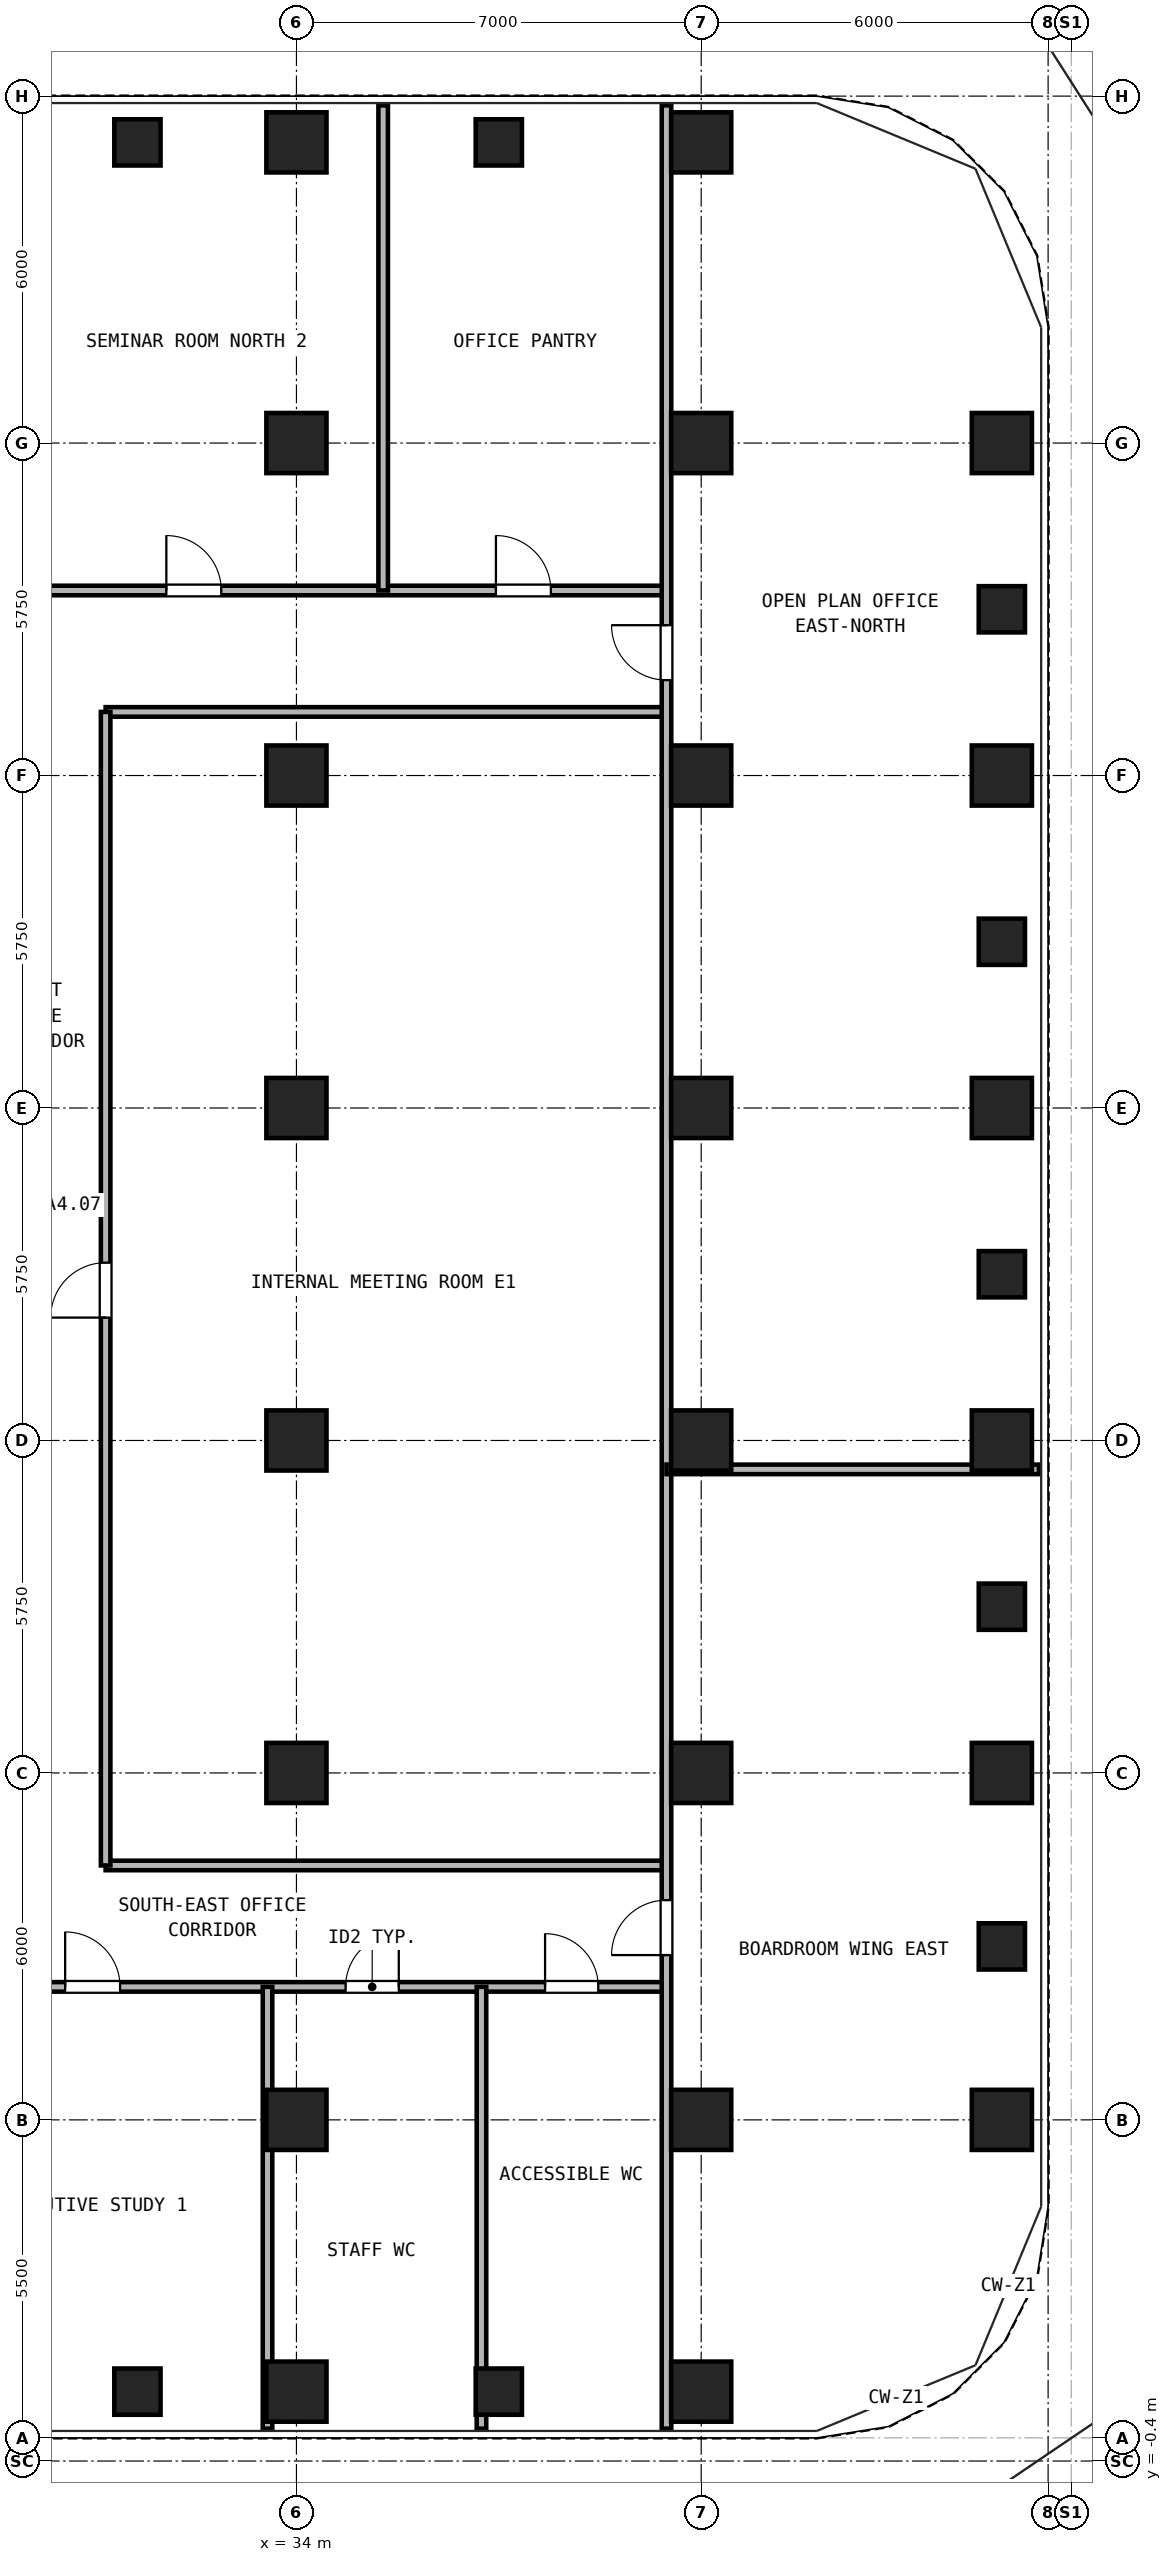
"""IFC4 building model, lengths in metres.
Left out: names, types, materials, properties, quantities, classifications, styles, units other than length and angle.
Written with IfcOpenShell. Run it as: python <this file> out.ifc"""

import sys

from ifc_helpers import new_model, si_unit, direction, frame, frame_2d, origin, origin_2d, place, context, subcontext, project, spatial, rectangle, hollow_rectangle, extrude, source, transform, mapped, element, fill, save


model = new_model("IFC4")
c1 = context("Model", 3, precision=1e-05, world=origin(), true_north=direction((0.0, 1.0)))
c2 = subcontext(c1, "Body", "Model", "MODEL_VIEW")
j1 = project(units=[si_unit("LENGTHUNIT", "METRE"), si_unit("PLANEANGLEUNIT", "RADIAN")], contexts=[c1])
p1 = place(None, origin())
s1 = spatial("IfcSite", under=j1, at=p1, CompositionType="ELEMENT")
p2 = place(p1, origin())
s2 = spatial("IfcBuilding", under=s1, at=p2, CompositionType="ELEMENT")
p3 = place(p2, frame((0.0, 0.0, 84.6)))
s3 = spatial("IfcBuildingStorey", under=s2, at=p3, CompositionType="ELEMENT", Elevation=84.6)
m1 = source(origin(), c2, "Body", "SweptSolid", [
    extrude(hollow_rectangle(XDim=1.04, YDim=1.04, WallThickness=0.065, at=origin_2d()), origin(), (0.0, 0.0, 1.0), 3.24),
])
for number, where, z_axis, x_axis in (
    (1, (34.0, 0.8, 0.0), (0.0, 0.0, 1.0), (1.0, 0.0, 0.0)),
    (2, (34.0, 39.7, 0.0), (0.0, 0.0, 1.0), (1.0, 0.0, 0.0)),
    (3, (41.0, 0.8, 0.0), (0.0, 0.0, 1.0), (1.0, 0.0, 0.0)),
    (4, (41.0, 39.7, 0.0), (0.0, 0.0, 1.0), (1.0, 0.0, 0.0)),
    (5, (46.2, 5.5, 0.0), (0.0, 0.0, 1.0), (1.0, 0.0, 0.0)),
    (6, (46.2, 11.5, 0.0), (0.0, 0.0, 1.0), (1.0, 0.0, 0.0)),
    (7, (46.2, 17.25, 0.0), (0.0, 0.0, 1.0), (1.0, 0.0, 0.0)),
    (8, (46.2, 23.0, 0.0), (0.0, 0.0, 1.0), (1.0, 0.0, 0.0)),
    (9, (46.2, 28.75, 0.0), (0.0, 0.0, 1.0), (1.0, 0.0, 0.0)),
    (10, (46.2, 34.5, 0.0), (0.0, 0.0, 1.0), (1.0, 0.0, 0.0)),
    (11, (34.0, 5.5, 0.0), (0.0, 0.0, 1.0), (1.0, 0.0, 0.0)),
    (12, (34.0, 11.5, 0.0), (0.0, 0.0, 1.0), (1.0, 0.0, 0.0)),
    (13, (34.0, 17.25, 0.0), (0.0, 0.0, 1.0), (1.0, 0.0, 0.0)),
    (14, (34.0, 23.0, 0.0), (0.0, 0.0, 1.0), (1.0, 0.0, 0.0)),
    (15, (34.0, 28.75, 0.0), (0.0, 0.0, 1.0), (1.0, 0.0, 0.0)),
    (16, (34.0, 34.5, 0.0), (0.0, 0.0, 1.0), (1.0, 0.0, 0.0)),
    (17, (41.0, 5.5, 0.0), (0.0, 0.0, 1.0), (1.0, 0.0, 0.0)),
    (18, (41.0, 11.5, 0.0), (0.0, 0.0, 1.0), (1.0, 0.0, 0.0)),
    (19, (41.0, 17.25, 0.0), (0.0, 0.0, 1.0), (1.0, 0.0, 0.0)),
    (20, (41.0, 23.0, 0.0), (0.0, 0.0, 1.0), (1.0, 0.0, 0.0)),
    (21, (41.0, 28.75, 0.0), (0.0, 0.0, 1.0), (1.0, 0.0, 0.0)),
    (22, (41.0, 34.5, 0.0), (0.0, 0.0, 1.0), (1.0, 0.0, 0.0)),
):
    element("IfcColumn", number, at=place(p3, frame(where, z_axis=z_axis, x_axis=x_axis)), inside=s3, PredefinedType="COLUMN", context=c2, shape_type="MappedRepresentation", body=[
        mapped(m1, transform((0.0, 0.0, 0.0), x_axis=(1.0, 0.0, 0.0), y_axis=(0.0, 1.0, 0.0), z_axis=(0.0, 0.0, 1.0), scale=1.0)),
    ])
m2 = source(origin(), c2, "Body", "SweptSolid", [
    extrude(hollow_rectangle(XDim=0.8, YDim=0.8, WallThickness=0.045, at=origin_2d()), origin(), (0.0, 0.0, 1.0), 3.24),
])
for number, where, z_axis, x_axis in (
    (23, (31.25, 0.8, 0.0), (0.0, 0.0, 1.0), (1.0, 0.0, 0.0)),
    (24, (31.25, 39.7, 0.0), (0.0, 0.0, 1.0), (1.0, 0.0, 0.0)),
    (25, (37.5, 0.8, 0.0), (0.0, 0.0, 1.0), (1.0, 0.0, 0.0)),
    (26, (37.5, 39.7, 0.0), (0.0, 0.0, 1.0), (1.0, 0.0, 0.0)),
    (27, (46.2, 8.5, 0.0), (0.0, 0.0, 1.0), (1.0, 0.0, 0.0)),
    (28, (46.2, 14.375, 0.0), (0.0, 0.0, 1.0), (1.0, 0.0, 0.0)),
    (29, (46.2, 20.125, 0.0), (0.0, 0.0, 1.0), (1.0, 0.0, 0.0)),
    (30, (46.2, 25.875, 0.0), (0.0, 0.0, 1.0), (1.0, 0.0, 0.0)),
    (31, (46.2, 31.625, 0.0), (0.0, 0.0, 1.0), (1.0, 0.0, 0.0)),
):
    element("IfcColumn", number, at=place(p3, frame(where, z_axis=z_axis, x_axis=x_axis)), inside=s3, PredefinedType="COLUMN", context=c2, shape_type="MappedRepresentation", body=[
        mapped(m2, transform((0.0, 0.0, 0.0), x_axis=(1.0, 0.0, 0.0), y_axis=(0.0, 1.0, 0.0), z_axis=(0.0, 0.0, 1.0), scale=1.0)),
    ])
p4 = place(p3, frame((6.6, 7.8, 0.0), z_axis=(0.0, 0.0, 1.0), x_axis=(1.0, 0.0, 0.0)))
e32 = element("IfcWall", 32, at=p4, inside=s3, PredefinedType="PARTITIONING", context=c2, shape_type="SweptSolid", body=[
    extrude(rectangle(XDim=33.8, YDim=0.165, at=frame_2d((16.9, 0.0))), origin(), (0.0, 0.0, 1.0), 3.24),
])
p5 = place(p4, frame((2.95, 0.0, 0.0)))
e33 = element("IfcOpeningElement", 33, at=p5, cuts=e32, PredefinedType="OPENING", context=c2, shape_type="SweptSolid", body=[
    extrude(rectangle(XDim=0.95, YDim=2.15, at=frame_2d((0.475, 1.075))), frame((0.0, 0.093, 0.0), z_axis=(0.0, -1.0, 0.0), x_axis=(1.0, 0.0, 0.0)), (0.0, 0.0, 1.0), 0.185),
])
p6 = place(p4, frame((9.9, 0.0, 0.0)))
e34 = element("IfcOpeningElement", 34, at=p6, cuts=e32, PredefinedType="OPENING", context=c2, shape_type="SweptSolid", body=[
    extrude(rectangle(XDim=0.95, YDim=2.15, at=frame_2d((0.475, 1.075))), frame((0.0, 0.093, 0.0), z_axis=(0.0, -1.0, 0.0), x_axis=(1.0, 0.0, 0.0)), (0.0, 0.0, 1.0), 0.185),
])
p7 = place(p4, frame((16.9, 0.0, 0.0)))
e35 = element("IfcOpeningElement", 35, at=p7, cuts=e32, PredefinedType="OPENING", context=c2, shape_type="SweptSolid", body=[
    extrude(rectangle(XDim=0.95, YDim=2.15, at=frame_2d((0.475, 1.075))), frame((0.0, 0.093, 0.0), z_axis=(0.0, -1.0, 0.0), x_axis=(1.0, 0.0, 0.0)), (0.0, 0.0, 1.0), 0.185),
])
p8 = place(p4, frame((23.4, 0.0, 0.0)))
e36 = element("IfcOpeningElement", 36, at=p8, cuts=e32, PredefinedType="OPENING", context=c2, shape_type="SweptSolid", body=[
    extrude(rectangle(XDim=0.95, YDim=2.15, at=frame_2d((0.475, 1.075))), frame((0.0, 0.093, 0.0), z_axis=(0.0, -1.0, 0.0), x_axis=(1.0, 0.0, 0.0)), (0.0, 0.0, 1.0), 0.185),
])
p9 = place(p4, frame((28.25, 0.0, 0.0)))
e37 = element("IfcOpeningElement", 37, at=p9, cuts=e32, PredefinedType="OPENING", context=c2, shape_type="SweptSolid", body=[
    extrude(rectangle(XDim=0.92, YDim=2.1, at=frame_2d((0.46, 1.05))), frame((0.0, 0.093, 0.0), z_axis=(0.0, -1.0, 0.0), x_axis=(1.0, 0.0, 0.0)), (0.0, 0.0, 1.0), 0.185),
])
p10 = place(p4, frame((31.7, 0.0, 0.0)))
e38 = element("IfcOpeningElement", 38, at=p10, cuts=e32, PredefinedType="OPENING", context=c2, shape_type="SweptSolid", body=[
    extrude(rectangle(XDim=0.92, YDim=2.1, at=frame_2d((0.46, 1.05))), frame((0.0, 0.093, 0.0), z_axis=(0.0, -1.0, 0.0), x_axis=(1.0, 0.0, 0.0)), (0.0, 0.0, 1.0), 0.185),
])
p11 = place(p3, frame((6.6, 31.95, 0.0), z_axis=(0.0, 0.0, 1.0), x_axis=(1.0, 0.0, 0.0)))
e39 = element("IfcWall", 39, at=p11, inside=s3, PredefinedType="PARTITIONING", context=c2, shape_type="SweptSolid", body=[
    extrude(rectangle(XDim=33.8, YDim=0.165, at=frame_2d((16.9, 0.0))), origin(), (0.0, 0.0, 1.0), 3.24),
])
p12 = place(p11, frame((3.2, 0.0, 0.0)))
e40 = element("IfcOpeningElement", 40, at=p12, cuts=e39, PredefinedType="OPENING", context=c2, shape_type="SweptSolid", body=[
    extrude(rectangle(XDim=0.95, YDim=2.15, at=frame_2d((0.475, 1.075))), frame((0.0, 0.093, 0.0), z_axis=(0.0, -1.0, 0.0), x_axis=(1.0, 0.0, 0.0)), (0.0, 0.0, 1.0), 0.185),
])
p13 = place(p11, frame((10.65, 0.0, 0.0)))
e41 = element("IfcOpeningElement", 41, at=p13, cuts=e39, PredefinedType="OPENING", context=c2, shape_type="SweptSolid", body=[
    extrude(rectangle(XDim=0.95, YDim=2.15, at=frame_2d((0.475, 1.075))), frame((0.0, 0.093, 0.0), z_axis=(0.0, -1.0, 0.0), x_axis=(1.0, 0.0, 0.0)), (0.0, 0.0, 1.0), 0.185),
])
p14 = place(p11, frame((18.15, 0.0, 0.0)))
e42 = element("IfcOpeningElement", 42, at=p14, cuts=e39, PredefinedType="OPENING", context=c2, shape_type="SweptSolid", body=[
    extrude(rectangle(XDim=0.95, YDim=2.15, at=frame_2d((0.475, 1.075))), frame((0.0, 0.093, 0.0), z_axis=(0.0, -1.0, 0.0), x_axis=(1.0, 0.0, 0.0)), (0.0, 0.0, 1.0), 0.185),
])
p15 = place(p11, frame((25.15, 0.0, 0.0)))
e43 = element("IfcOpeningElement", 43, at=p15, cuts=e39, PredefinedType="OPENING", context=c2, shape_type="SweptSolid", body=[
    extrude(rectangle(XDim=0.95, YDim=2.15, at=frame_2d((0.475, 1.075))), frame((0.0, 0.093, 0.0), z_axis=(0.0, -1.0, 0.0), x_axis=(1.0, 0.0, 0.0)), (0.0, 0.0, 1.0), 0.185),
])
p16 = place(p11, frame((30.85, 0.0, 0.0)))
e44 = element("IfcOpeningElement", 44, at=p16, cuts=e39, PredefinedType="OPENING", context=c2, shape_type="SweptSolid", body=[
    extrude(rectangle(XDim=0.95, YDim=2.15, at=frame_2d((0.475, 1.075))), frame((0.0, 0.093, 0.0), z_axis=(0.0, -1.0, 0.0), x_axis=(1.0, 0.0, 0.0)), (0.0, 0.0, 1.0), 0.185),
])
for number, where, z_axis, x_axis in (
    (45, (30.7, 9.9, 0.0), (0.0, 0.0, 1.0), (1.0, 0.0, 0.0)),
    (46, (30.7, 29.85, 0.0), (0.0, 0.0, 1.0), (1.0, 0.0, 0.0)),
):
    element("IfcWall", number, at=place(p3, frame(where, z_axis=z_axis, x_axis=x_axis)), inside=s3, PredefinedType="PARTITIONING", context=c2, shape_type="SweptSolid", body=[
        extrude(rectangle(XDim=9.7, YDim=0.165, at=frame_2d((4.85, 0.0))), origin(), (0.0, 0.0, 1.0), 3.24),
    ])
p17 = place(p3, frame((30.7, 9.9, 0.0), z_axis=(0.0, 0.0, 1.0), x_axis=(0.0, 1.0, 0.0)))
e47 = element("IfcWall", 47, at=p17, inside=s3, PredefinedType="PARTITIONING", context=c2, shape_type="SweptSolid", body=[
    extrude(rectangle(XDim=19.95, YDim=0.165, at=frame_2d((9.975, 0.0))), origin(), (0.0, 0.0, 1.0), 3.24),
])
p18 = place(p17, frame((9.475, 0.0, 0.0)))
e48 = element("IfcOpeningElement", 48, at=p18, cuts=e47, PredefinedType="OPENING", context=c2, shape_type="SweptSolid", body=[
    extrude(rectangle(XDim=0.95, YDim=2.15, at=frame_2d((0.475, 1.075))), frame((0.0, 0.093, 0.0), z_axis=(0.0, -1.0, 0.0), x_axis=(1.0, 0.0, 0.0)), (0.0, 0.0, 1.0), 0.185),
])
p19 = place(p3, frame((40.4, 0.16, 0.0), z_axis=(0.0, 0.0, 1.0), x_axis=(0.0, 1.0, 0.0)))
e49 = element("IfcWall", 49, at=p19, inside=s3, PredefinedType="PARTITIONING", context=c2, shape_type="SweptSolid", body=[
    extrude(rectangle(XDim=40.18, YDim=0.165, at=frame_2d((20.09, 0.0))), origin(), (0.0, 0.0, 1.0), 3.24),
])
p20 = place(p19, frame((8.19, 0.0, 0.0)))
e50 = element("IfcOpeningElement", 50, at=p20, cuts=e49, PredefinedType="OPENING", context=c2, shape_type="SweptSolid", body=[
    extrude(rectangle(XDim=0.95, YDim=2.15, at=frame_2d((0.475, 1.075))), frame((0.0, 0.093, 0.0), z_axis=(0.0, -1.0, 0.0), x_axis=(1.0, 0.0, 0.0)), (0.0, 0.0, 1.0), 0.185),
])
p21 = place(p19, frame((30.24, 0.0, 0.0)))
e51 = element("IfcOpeningElement", 51, at=p21, cuts=e49, PredefinedType="OPENING", context=c2, shape_type="SweptSolid", body=[
    extrude(rectangle(XDim=0.95, YDim=2.15, at=frame_2d((0.475, 1.075))), frame((0.0, 0.093, 0.0), z_axis=(0.0, -1.0, 0.0), x_axis=(1.0, 0.0, 0.0)), (0.0, 0.0, 1.0), 0.185),
])
for number, where, z_axis, x_axis in (
    (52, (33.5, 0.16, 0.0), (0.0, 0.0, 1.0), (0.0, 1.0, 0.0)),
    (53, (37.2, 0.16, 0.0), (0.0, 0.0, 1.0), (0.0, 1.0, 0.0)),
):
    element("IfcWall", number, at=place(p3, frame(where, z_axis=z_axis, x_axis=x_axis)), inside=s3, PredefinedType="PARTITIONING", context=c2, shape_type="SweptSolid", body=[
        extrude(rectangle(XDim=7.64, YDim=0.165, at=frame_2d((3.82, 0.0))), origin(), (0.0, 0.0, 1.0), 3.24),
    ])
p22 = place(p3, frame((35.5, 31.95, 0.0), z_axis=(0.0, 0.0, 1.0), x_axis=(0.0, 1.0, 0.0)))
e54 = element("IfcWall", 54, at=p22, inside=s3, PredefinedType="PARTITIONING", context=c2, shape_type="SweptSolid", body=[
    extrude(rectangle(XDim=8.39, YDim=0.165, at=frame_2d((4.195, 0.0))), origin(), (0.0, 0.0, 1.0), 3.24),
])
p23 = place(p3, frame((40.4, 16.75, 0.0), z_axis=(0.0, 0.0, 1.0), x_axis=(1.0, 0.0, 0.0)))
e55 = element("IfcWall", 55, at=p23, inside=s3, PredefinedType="PARTITIONING", context=c2, shape_type="SweptSolid", body=[
    extrude(rectangle(XDim=6.44, YDim=0.165, at=frame_2d((3.22, 0.0))), origin(), (0.0, 0.0, 1.0), 3.24),
])
p24 = place(p8, frame((0.95, 0.0, 0.0), z_axis=(0.0, 0.0, 1.0), x_axis=(-1.0, 0.0, 0.0)))
e56 = element("IfcDoor", 56, at=p24, inside=s3, OperationType="SINGLE_SWING_LEFT", PredefinedType="DOOR", context=c2, shape_type="SweptSolid", body=[
    extrude(rectangle(XDim=0.95, YDim=2.15, at=frame_2d((0.475, 1.075))), frame((0.0, 0.025, 0.0), z_axis=(0.0, -1.0, 0.0), x_axis=(1.0, 0.0, 0.0)), (0.0, 0.0, 1.0), 0.05),
])
fill(e36, e56)
p25 = place(p9, frame((0.92, 0.0, 0.0), z_axis=(0.0, 0.0, 1.0), x_axis=(-1.0, 0.0, 0.0)))
e57 = element("IfcDoor", 57, at=p25, inside=s3, OperationType="SINGLE_SWING_RIGHT", PredefinedType="DOOR", context=c2, shape_type="SweptSolid", body=[
    extrude(rectangle(XDim=0.92, YDim=2.1, at=frame_2d((0.46, 1.05))), frame((0.0, 0.025, 0.0), z_axis=(0.0, -1.0, 0.0), x_axis=(1.0, 0.0, 0.0)), (0.0, 0.0, 1.0), 0.05),
])
fill(e37, e57)
p26 = place(p10, frame((0.92, 0.0, 0.0), z_axis=(0.0, 0.0, 1.0), x_axis=(-1.0, 0.0, 0.0)))
e58 = element("IfcDoor", 58, at=p26, inside=s3, OperationType="SINGLE_SWING_LEFT", PredefinedType="DOOR", context=c2, shape_type="SweptSolid", body=[
    extrude(rectangle(XDim=0.92, YDim=2.1, at=frame_2d((0.46, 1.05))), frame((0.0, 0.025, 0.0), z_axis=(0.0, -1.0, 0.0), x_axis=(1.0, 0.0, 0.0)), (0.0, 0.0, 1.0), 0.05),
])
fill(e38, e58)
p27 = place(p15, origin())
e59 = element("IfcDoor", 59, at=p27, inside=s3, OperationType="SINGLE_SWING_LEFT", PredefinedType="DOOR", context=c2, shape_type="SweptSolid", body=[
    extrude(rectangle(XDim=0.95, YDim=2.15, at=frame_2d((0.475, 1.075))), frame((0.0, 0.025, 0.0), z_axis=(0.0, -1.0, 0.0), x_axis=(1.0, 0.0, 0.0)), (0.0, 0.0, 1.0), 0.05),
])
fill(e43, e59)
p28 = place(p16, origin())
e60 = element("IfcDoor", 60, at=p28, inside=s3, OperationType="SINGLE_SWING_LEFT", PredefinedType="DOOR", context=c2, shape_type="SweptSolid", body=[
    extrude(rectangle(XDim=0.95, YDim=2.15, at=frame_2d((0.475, 1.075))), frame((0.0, 0.025, 0.0), z_axis=(0.0, -1.0, 0.0), x_axis=(1.0, 0.0, 0.0)), (0.0, 0.0, 1.0), 0.05),
])
fill(e44, e60)
p29 = place(p20, origin())
e61 = element("IfcDoor", 61, at=p29, inside=s3, OperationType="SINGLE_SWING_LEFT", PredefinedType="DOOR", context=c2, shape_type="SweptSolid", body=[
    extrude(rectangle(XDim=0.95, YDim=2.15, at=frame_2d((0.475, 1.075))), frame((0.0, 0.025, 0.0), z_axis=(0.0, -1.0, 0.0), x_axis=(1.0, 0.0, 0.0)), (0.0, 0.0, 1.0), 0.05),
])
fill(e50, e61)
p30 = place(p21, origin())
e62 = element("IfcDoor", 62, at=p30, inside=s3, OperationType="SINGLE_SWING_RIGHT", PredefinedType="DOOR", context=c2, shape_type="SweptSolid", body=[
    extrude(rectangle(XDim=0.95, YDim=2.15, at=frame_2d((0.475, 1.075))), frame((0.0, 0.025, 0.0), z_axis=(0.0, -1.0, 0.0), x_axis=(1.0, 0.0, 0.0)), (0.0, 0.0, 1.0), 0.05),
])
fill(e51, e62)
p31 = place(p18, origin())
e63 = element("IfcDoor", 63, at=p31, inside=s3, OperationType="SINGLE_SWING_LEFT", PredefinedType="DOOR", context=c2, shape_type="SweptSolid", body=[
    extrude(rectangle(XDim=0.95, YDim=2.15, at=frame_2d((0.475, 1.075))), frame((0.0, 0.025, 0.0), z_axis=(0.0, -1.0, 0.0), x_axis=(1.0, 0.0, 0.0)), (0.0, 0.0, 1.0), 0.05),
])
fill(e48, e63)
save(model, sys.argv[1])
